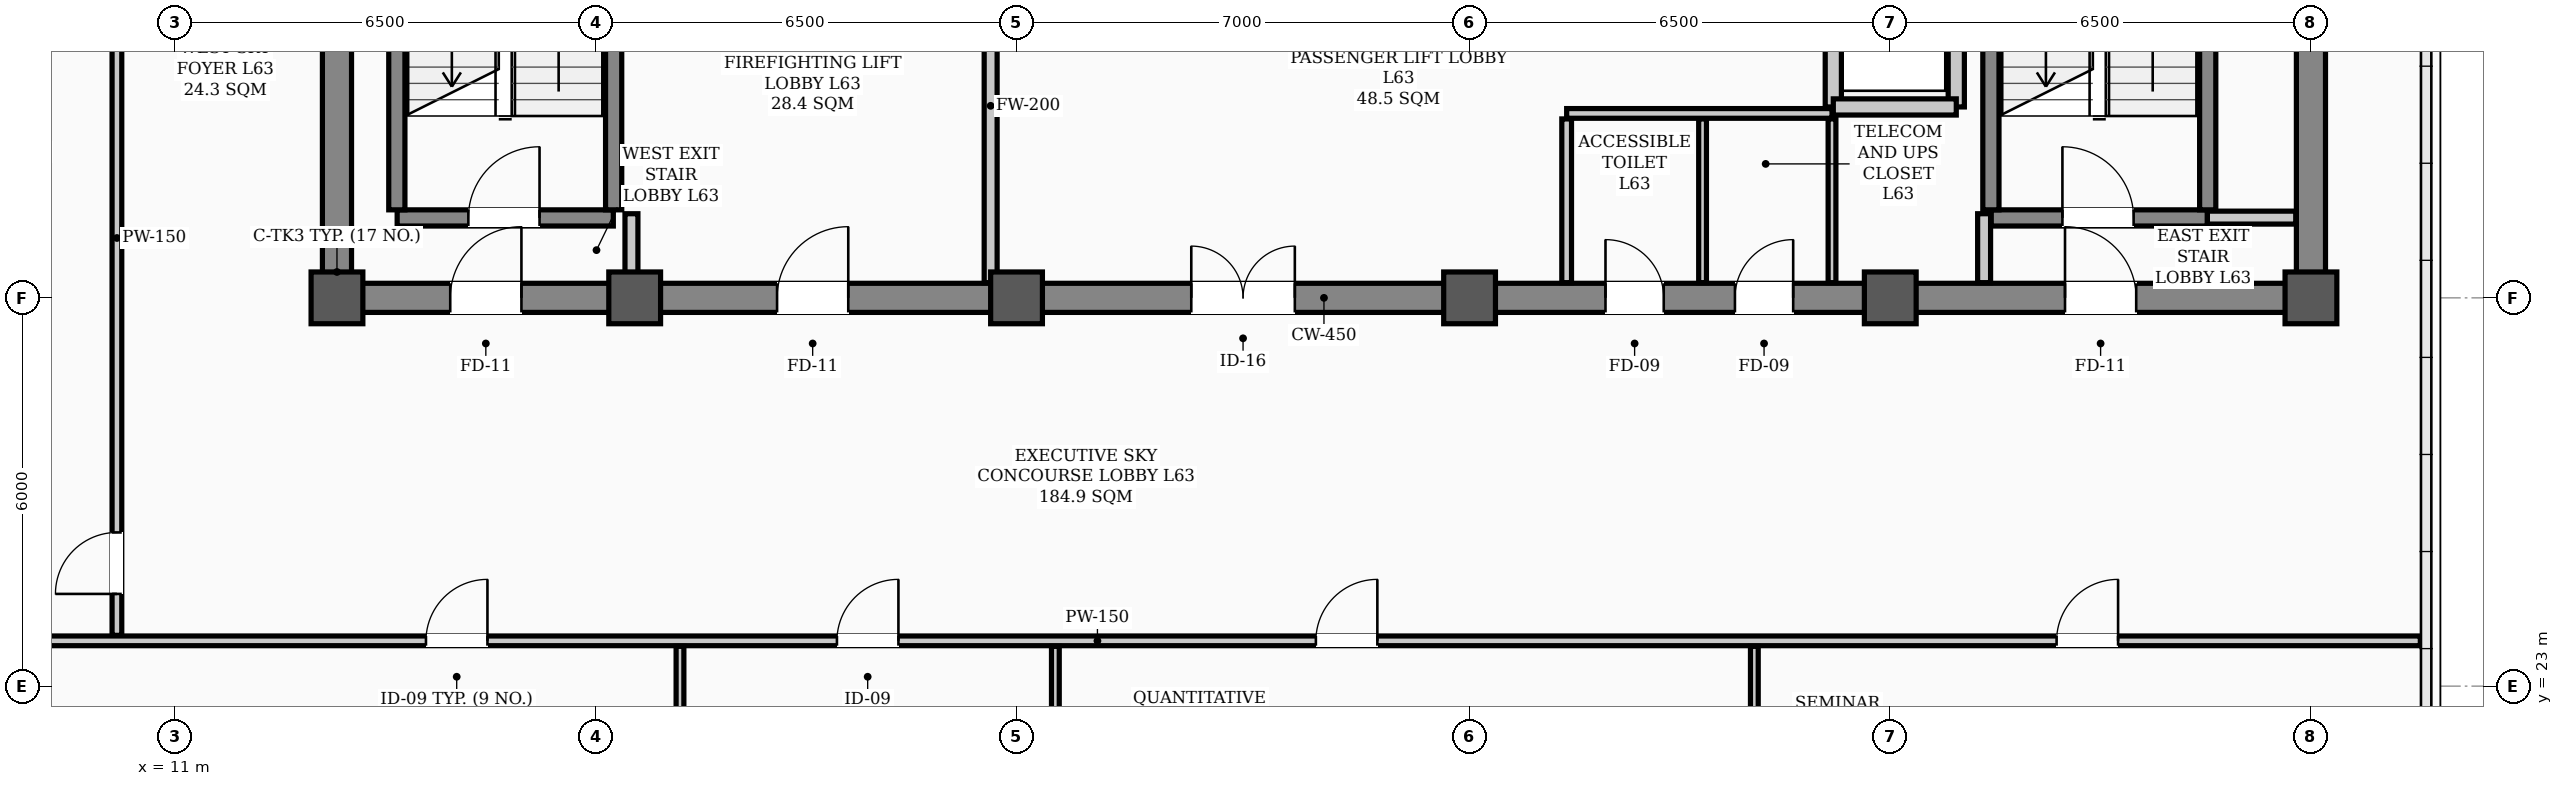
"""IFC4 building model, lengths in metres.
Left out: names, types, materials, properties, quantities, classifications, styles, units other than length and angle.
Written with IfcOpenShell. Run it as: python <this file> out.ifc"""

import sys

from ifc_helpers import new_model, si_unit, direction, frame, frame_2d, origin, origin_2d, place, context, subcontext, project, spatial, rectangle, hollow_rectangle, extrude, element, fill, save


model = new_model("IFC4")
c1 = context("Model", 3, precision=1e-05, world=origin(), true_north=direction((0.0, 1.0)))
c2 = subcontext(c1, "Body", "Model", "MODEL_VIEW")
j1 = project(units=[si_unit("LENGTHUNIT", "METRE"), si_unit("PLANEANGLEUNIT", "RADIAN")], contexts=[c1])
p1 = place(None, origin())
s1 = spatial("IfcSite", under=j1, at=p1, CompositionType="ELEMENT")
p2 = place(p1, origin())
s2 = spatial("IfcBuilding", under=s1, at=p2, CompositionType="ELEMENT")
p3 = place(p2, frame((0.0, 0.0, 254.0)))
s3 = spatial("IfcBuildingStorey", under=s2, at=p3, CompositionType="ELEMENT", Elevation=254.0)
for number, where, z_axis, x_axis in (
    (1, (13.5, 29.0, 0.0), (0.0, 0.0, 1.0), (1.0, 0.0, 0.0)),
    (2, (18.1, 29.0, 0.0), (0.0, 0.0, 1.0), (1.0, 0.0, 0.0)),
    (3, (24.0, 29.0, 0.0), (0.0, 0.0, 1.0), (1.0, 0.0, 0.0)),
    (4, (31.0, 29.0, 0.0), (0.0, 0.0, 1.0), (1.0, 0.0, 0.0)),
    (5, (37.5, 29.0, 0.0), (0.0, 0.0, 1.0), (1.0, 0.0, 0.0)),
    (6, (44.0, 29.0, 0.0), (0.0, 0.0, 1.0), (1.0, 0.0, 0.0)),
):
    element("IfcColumn", number, at=place(p3, frame(where, z_axis=z_axis, x_axis=x_axis)), inside=s3, PredefinedType="COLUMN", context=c2, shape_type="SweptSolid", body=[
        extrude(hollow_rectangle(XDim=0.8, YDim=0.8, WallThickness=0.032, InnerFilletRadius=0.016, OuterFilletRadius=0.048, at=origin_2d()), origin(), (0.0, 0.0, 1.0), 3.9),
    ])
p4 = place(p3, frame((13.5, 29.0, 0.0), z_axis=(0.0, 0.0, 1.0), x_axis=(1.0, 0.0, 0.0)))
e7 = element("IfcWall", 7, at=p4, inside=s3, PredefinedType="SHEAR", context=c2, shape_type="SweptSolid", body=[
    extrude(rectangle(XDim=30.5, YDim=0.45, at=frame_2d((15.25, 0.0))), origin(), (0.0, 0.0, 1.0), 3.66),
])
p5 = place(p4, frame((1.75, 0.0, 0.0)))
e8 = element("IfcOpeningElement", 8, at=p5, cuts=e7, PredefinedType="OPENING", context=c2, shape_type="SweptSolid", body=[
    extrude(rectangle(XDim=1.1, YDim=2.08, at=frame_2d((0.55, 1.04))), frame((0.0, 0.235, 0.0), z_axis=(0.0, -1.0, 0.0), x_axis=(1.0, 0.0, 0.0)), (0.0, 0.0, 1.0), 0.47),
])
p6 = place(p4, frame((26.7, 0.0, 0.0)))
e9 = element("IfcOpeningElement", 9, at=p6, cuts=e7, PredefinedType="OPENING", context=c2, shape_type="SweptSolid", body=[
    extrude(rectangle(XDim=1.1, YDim=2.08, at=frame_2d((0.55, 1.04))), frame((0.0, 0.235, 0.0), z_axis=(0.0, -1.0, 0.0), x_axis=(1.0, 0.0, 0.0)), (0.0, 0.0, 1.0), 0.47),
])
p7 = place(p4, frame((6.8, 0.0, 0.0)))
e10 = element("IfcOpeningElement", 10, at=p7, cuts=e7, PredefinedType="OPENING", context=c2, shape_type="SweptSolid", body=[
    extrude(rectangle(XDim=1.1, YDim=2.08, at=frame_2d((0.55, 1.04))), frame((0.0, 0.235, 0.0), z_axis=(0.0, -1.0, 0.0), x_axis=(1.0, 0.0, 0.0)), (0.0, 0.0, 1.0), 0.47),
])
p8 = place(p4, frame((13.2, 0.0, 0.0)))
e11 = element("IfcOpeningElement", 11, at=p8, cuts=e7, PredefinedType="OPENING", context=c2, shape_type="SweptSolid", body=[
    extrude(rectangle(XDim=1.6, YDim=2.08, at=frame_2d((0.8, 1.04))), frame((0.0, 0.235, 0.0), z_axis=(0.0, -1.0, 0.0), x_axis=(1.0, 0.0, 0.0)), (0.0, 0.0, 1.0), 0.47),
])
p9 = place(p4, frame((19.6, 0.0, 0.0)))
e12 = element("IfcOpeningElement", 12, at=p9, cuts=e7, PredefinedType="OPENING", context=c2, shape_type="SweptSolid", body=[
    extrude(rectangle(XDim=0.9, YDim=2.08, at=frame_2d((0.45, 1.04))), frame((0.0, 0.235, 0.0), z_axis=(0.0, -1.0, 0.0), x_axis=(1.0, 0.0, 0.0)), (0.0, 0.0, 1.0), 0.47),
])
p10 = place(p4, frame((21.6, 0.0, 0.0)))
e13 = element("IfcOpeningElement", 13, at=p10, cuts=e7, PredefinedType="OPENING", context=c2, shape_type="SweptSolid", body=[
    extrude(rectangle(XDim=0.9, YDim=2.08, at=frame_2d((0.45, 1.04))), frame((0.0, 0.235, 0.0), z_axis=(0.0, -1.0, 0.0), x_axis=(1.0, 0.0, 0.0)), (0.0, 0.0, 1.0), 0.47),
])
for number, where, z_axis, x_axis in (
    (14, (13.5, 29.35, 0.0), (0.0, 0.0, 1.0), (0.0, 1.0, 0.0)),
    (15, (44.0, 29.35, 0.0), (0.0, 0.0, 1.0), (0.0, 1.0, 0.0)),
):
    element("IfcWall", number, at=place(p3, frame(where, z_axis=z_axis, x_axis=x_axis)), inside=s3, PredefinedType="SHEAR", context=c2, shape_type="SweptSolid", body=[
        extrude(rectangle(XDim=8.6, YDim=0.45, at=frame_2d((4.3, 0.0))), origin(), (0.0, 0.0, 1.0), 3.66),
    ])
p11 = place(p3, frame((14.43, 30.235, 0.0), z_axis=(0.0, 0.0, 1.0), x_axis=(1.0, 0.0, 0.0)))
e16 = element("IfcWall", 16, at=p11, inside=s3, PredefinedType="STANDARD", context=c2, shape_type="SweptSolid", body=[
    extrude(rectangle(XDim=3.34, YDim=0.25, at=frame_2d((1.67, 0.0))), origin(), (0.0, 0.0, 1.0), 3.66),
])
p12 = place(p11, frame((1.1, 0.0, 0.0)))
e17 = element("IfcOpeningElement", 17, at=p12, cuts=e16, PredefinedType="OPENING", context=c2, shape_type="SweptSolid", body=[
    extrude(rectangle(XDim=1.1, YDim=2.08, at=frame_2d((0.55, 1.04))), frame((0.0, 0.135, 0.0), z_axis=(0.0, -1.0, 0.0), x_axis=(1.0, 0.0, 0.0)), (0.0, 0.0, 1.0), 0.27),
])
for number, where, z_axis, x_axis in (
    (18, (14.425, 30.36, 0.0), (0.0, 0.0, 1.0), (0.0, 1.0, 0.0)),
    (19, (17.775, 30.36, 0.0), (0.0, 0.0, 1.0), (0.0, 1.0, 0.0)),
):
    element("IfcWall", number, at=place(p3, frame(where, z_axis=z_axis, x_axis=x_axis)), inside=s3, PredefinedType="STANDARD", context=c2, shape_type="SweptSolid", body=[
        extrude(rectangle(XDim=7.184, YDim=0.25, at=frame_2d((3.592, 0.0))), origin(), (0.0, 0.0, 1.0), 3.66),
    ])
p13 = place(p3, frame((39.06, 30.235, 0.0), z_axis=(0.0, 0.0, 1.0), x_axis=(1.0, 0.0, 0.0)))
e20 = element("IfcWall", 20, at=p13, inside=s3, PredefinedType="STANDARD", context=c2, shape_type="SweptSolid", body=[
    extrude(rectangle(XDim=3.34, YDim=0.25, at=frame_2d((1.67, 0.0))), origin(), (0.0, 0.0, 1.0), 3.66),
])
p14 = place(p13, frame((1.1, 0.0, 0.0)))
e21 = element("IfcOpeningElement", 21, at=p14, cuts=e20, PredefinedType="OPENING", context=c2, shape_type="SweptSolid", body=[
    extrude(rectangle(XDim=1.1, YDim=2.08, at=frame_2d((0.55, 1.04))), frame((0.0, 0.135, 0.0), z_axis=(0.0, -1.0, 0.0), x_axis=(1.0, 0.0, 0.0)), (0.0, 0.0, 1.0), 0.27),
])
for number, where, z_axis, x_axis in (
    (22, (39.055, 30.36, 0.0), (0.0, 0.0, 1.0), (0.0, 1.0, 0.0)),
    (23, (42.405, 30.36, 0.0), (0.0, 0.0, 1.0), (0.0, 1.0, 0.0)),
):
    element("IfcWall", number, at=place(p3, frame(where, z_axis=z_axis, x_axis=x_axis)), inside=s3, PredefinedType="STANDARD", context=c2, shape_type="SweptSolid", body=[
        extrude(rectangle(XDim=7.184, YDim=0.25, at=frame_2d((3.592, 0.0))), origin(), (0.0, 0.0, 1.0), 3.66),
    ])
p15 = place(p3, frame((36.62, 31.95, 0.0), z_axis=(0.0, 0.0, 1.0), x_axis=(0.0, 1.0, 0.0)))
e24 = element("IfcWall", 24, at=p15, inside=s3, PredefinedType="STANDARD", context=c2, shape_type="SweptSolid", body=[
    extrude(rectangle(XDim=6.0, YDim=0.25, at=frame_2d((3.0, 0.0))), origin(), (0.0, 0.0, 1.0), 2.24),
])
p16 = place(p15, frame((0.9, 0.0, 0.0)))
e25 = element("IfcOpeningElement", 25, at=p16, cuts=e24, PredefinedType="OPENING", context=c2, shape_type="SweptSolid", body=[
    extrude(rectangle(XDim=1.1, YDim=2.08, at=frame_2d((0.55, 1.04))), frame((0.0, 0.135, 0.0), z_axis=(0.0, -1.0, 0.0), x_axis=(1.0, 0.0, 0.0)), (0.0, 0.0, 1.0), 0.27),
])
p17 = place(p15, frame((4.0, 0.0, 0.0)))
e26 = element("IfcOpeningElement", 26, at=p17, cuts=e24, PredefinedType="OPENING", context=c2, shape_type="SweptSolid", body=[
    extrude(rectangle(XDim=1.1, YDim=2.08, at=frame_2d((0.55, 1.04))), frame((0.0, 0.135, 0.0), z_axis=(0.0, -1.0, 0.0), x_axis=(1.0, 0.0, 0.0)), (0.0, 0.0, 1.0), 0.27),
])
p18 = place(p3, frame((38.52, 31.95, 0.0), z_axis=(0.0, 0.0, 1.0), x_axis=(0.0, 1.0, 0.0)))
e27 = element("IfcWall", 27, at=p18, inside=s3, PredefinedType="STANDARD", context=c2, shape_type="SweptSolid", body=[
    extrude(rectangle(XDim=6.0, YDim=0.25, at=frame_2d((3.0, 0.0))), origin(), (0.0, 0.0, 1.0), 3.48),
])
p19 = place(p3, frame((36.62, 31.95, 0.0), z_axis=(0.0, 0.0, 1.0), x_axis=(1.0, 0.0, 0.0)))
e28 = element("IfcWall", 28, at=p19, inside=s3, PredefinedType="STANDARD", context=c2, shape_type="SweptSolid", body=[
    extrude(rectangle(XDim=1.9, YDim=0.25, at=frame_2d((0.95, 0.0))), origin(), (0.0, 0.0, 1.0), 3.48),
])
p20 = place(p3, frame((42.4, 30.24, 0.0), z_axis=(0.0, 0.0, 1.0), x_axis=(1.0, 0.0, 0.0)))
e29 = element("IfcWall", 29, at=p20, inside=s3, PredefinedType="STANDARD", context=c2, shape_type="SweptSolid", body=[
    extrude(rectangle(XDim=1.365, YDim=0.2, at=frame_2d((0.683, 0.0))), origin(), (0.0, 0.0, 1.0), 3.66),
])
p21 = place(p3, frame((32.5, 31.85, 0.0), z_axis=(0.0, 0.0, 1.0), x_axis=(1.0, 0.0, 0.0)))
e30 = element("IfcWall", 30, at=p21, inside=s3, PredefinedType="PARTITIONING", context=c2, shape_type="SweptSolid", body=[
    extrude(rectangle(XDim=4.1, YDim=0.15, at=frame_2d((2.05, 0.0))), origin(), (0.0, 0.0, 1.0), 3.66),
])
p22 = place(p3, frame((4.81, 23.7, 0.0), z_axis=(0.0, 0.0, 1.0), x_axis=(1.0, 0.0, 0.0)))
e31 = element("IfcWall", 31, at=p22, inside=s3, PredefinedType="PARTITIONING", context=c2, shape_type="SweptSolid", body=[
    extrude(rectangle(XDim=40.88, YDim=0.15, at=frame_2d((20.44, 0.0))), origin(), (0.0, 0.0, 1.0), 2.24),
])
p23 = place(p22, frame((10.065, 0.0, 0.0)))
e32 = element("IfcOpeningElement", 32, at=p23, cuts=e31, PredefinedType="OPENING", context=c2, shape_type="SweptSolid", body=[
    extrude(rectangle(XDim=0.95, YDim=2.08, at=frame_2d((0.475, 1.04))), frame((0.0, 0.085, 0.0), z_axis=(0.0, -1.0, 0.0), x_axis=(1.0, 0.0, 0.0)), (0.0, 0.0, 1.0), 0.17),
])
p24 = place(p22, frame((16.415, 0.0, 0.0)))
e33 = element("IfcOpeningElement", 33, at=p24, cuts=e31, PredefinedType="OPENING", context=c2, shape_type="SweptSolid", body=[
    extrude(rectangle(XDim=0.95, YDim=2.08, at=frame_2d((0.475, 1.04))), frame((0.0, 0.085, 0.0), z_axis=(0.0, -1.0, 0.0), x_axis=(1.0, 0.0, 0.0)), (0.0, 0.0, 1.0), 0.17),
])
p25 = place(p22, frame((23.815, 0.0, 0.0)))
e34 = element("IfcOpeningElement", 34, at=p25, cuts=e31, PredefinedType="OPENING", context=c2, shape_type="SweptSolid", body=[
    extrude(rectangle(XDim=0.95, YDim=2.08, at=frame_2d((0.475, 1.04))), frame((0.0, 0.085, 0.0), z_axis=(0.0, -1.0, 0.0), x_axis=(1.0, 0.0, 0.0)), (0.0, 0.0, 1.0), 0.17),
])
p26 = place(p22, frame((35.26, 0.0, 0.0)))
e35 = element("IfcOpeningElement", 35, at=p26, cuts=e31, PredefinedType="OPENING", context=c2, shape_type="SweptSolid", body=[
    extrude(rectangle(XDim=0.95, YDim=2.08, at=frame_2d((0.475, 1.04))), frame((0.0, 0.085, 0.0), z_axis=(0.0, -1.0, 0.0), x_axis=(1.0, 0.0, 0.0)), (0.0, 0.0, 1.0), 0.17),
])
p27 = place(p3, frame((18.05, 29.235, 0.0), z_axis=(0.0, 0.0, 1.0), x_axis=(0.0, 1.0, 0.0)))
e36 = element("IfcWall", 36, at=p27, inside=s3, PredefinedType="STANDARD", context=c2, shape_type="SweptSolid", body=[
    extrude(rectangle(XDim=1.065, YDim=0.2, at=frame_2d((0.532, 0.0))), origin(), (0.0, 0.0, 1.0), 2.24),
])
p28 = place(p3, frame((38.95, 29.235, 0.0), z_axis=(0.0, 0.0, 1.0), x_axis=(0.0, 1.0, 0.0)))
e37 = element("IfcWall", 37, at=p28, inside=s3, PredefinedType="STANDARD", context=c2, shape_type="SweptSolid", body=[
    extrude(rectangle(XDim=1.065, YDim=0.2, at=frame_2d((0.532, 0.0))), origin(), (0.0, 0.0, 1.0), 3.66),
])
p29 = place(p3, frame((23.6, 29.235, 0.0), z_axis=(0.0, 0.0, 1.0), x_axis=(0.0, 1.0, 0.0)))
e38 = element("IfcWall", 38, at=p29, inside=s3, PredefinedType="STANDARD", context=c2, shape_type="SweptSolid", body=[
    extrude(rectangle(XDim=5.465, YDim=0.2, at=frame_2d((2.732, 0.0))), origin(), (0.0, 0.0, 1.0), 2.24),
])
p30 = place(p3, frame((32.5, 29.235, 0.0), z_axis=(0.0, 0.0, 1.0), x_axis=(0.0, 1.0, 0.0)))
e39 = element("IfcWall", 39, at=p30, inside=s3, PredefinedType="PARTITIONING", context=c2, shape_type="SweptSolid", body=[
    extrude(rectangle(XDim=2.53, YDim=0.15, at=frame_2d((1.265, 0.0))), origin(), (0.0, 0.0, 1.0), 2.24),
])
for number, where, z_axis, x_axis in (
    (40, (36.6, 29.235, 0.0), (0.0, 0.0, 1.0), (0.0, 1.0, 0.0)),
    (41, (34.6, 29.235, 0.0), (0.0, 0.0, 1.0), (0.0, 1.0, 0.0)),
):
    element("IfcWall", number, at=place(p3, frame(where, z_axis=z_axis, x_axis=x_axis)), inside=s3, PredefinedType="PARTITIONING", context=c2, shape_type="SweptSolid", body=[
        extrude(rectangle(XDim=2.53, YDim=0.12, at=frame_2d((1.265, 0.0))), origin(), (0.0, 0.0, 1.0), 2.24),
    ])
p31 = place(p3, frame((10.1, 23.785, 0.0), z_axis=(0.0, 0.0, 1.0), x_axis=(0.0, 1.0, 0.0)))
e42 = element("IfcWall", 42, at=p31, inside=s3, PredefinedType="PARTITIONING", context=c2, shape_type="SweptSolid", body=[
    extrude(rectangle(XDim=12.28, YDim=0.15, at=frame_2d((6.14, 0.0))), origin(), (0.0, 0.0, 1.0), 2.24),
])
p32 = place(p31, frame((0.64, 0.0, 0.0)))
e43 = element("IfcOpeningElement", 43, at=p32, cuts=e42, PredefinedType="OPENING", context=c2, shape_type="SweptSolid", body=[
    extrude(rectangle(XDim=0.95, YDim=2.08, at=frame_2d((0.475, 1.04))), frame((0.0, 0.085, 0.0), z_axis=(0.0, -1.0, 0.0), x_axis=(1.0, 0.0, 0.0)), (0.0, 0.0, 1.0), 0.17),
])
p33 = place(p3, frame((18.8, 12.41, 0.0), z_axis=(0.0, 0.0, 1.0), x_axis=(0.0, 1.0, 0.0)))
e44 = element("IfcWall", 44, at=p33, inside=s3, PredefinedType="PARTITIONING", context=c2, shape_type="SweptSolid", body=[
    extrude(rectangle(XDim=11.205, YDim=0.12, at=frame_2d((5.603, 0.0))), origin(), (0.0, 0.0, 1.0), 2.24),
])
p34 = place(p3, frame((24.6, 14.17, 0.0), z_axis=(0.0, 0.0, 1.0), x_axis=(0.0, 1.0, 0.0)))
e45 = element("IfcWall", 45, at=p34, inside=s3, PredefinedType="PARTITIONING", context=c2, shape_type="SweptSolid", body=[
    extrude(rectangle(XDim=9.445, YDim=0.12, at=frame_2d((4.723, 0.0))), origin(), (0.0, 0.0, 1.0), 2.24),
])
p35 = place(p3, frame((35.4, 12.41, 0.0), z_axis=(0.0, 0.0, 1.0), x_axis=(0.0, 1.0, 0.0)))
e46 = element("IfcWall", 46, at=p35, inside=s3, PredefinedType="PARTITIONING", context=c2, shape_type="SweptSolid", body=[
    extrude(rectangle(XDim=11.205, YDim=0.12, at=frame_2d((5.603, 0.0))), origin(), (0.0, 0.0, 1.0), 2.24),
])
p36 = place(p12, origin())
e47 = element("IfcDoor", 47, at=p36, inside=s3, OperationType="SINGLE_SWING_RIGHT", PredefinedType="DOOR", context=c2, shape_type="SweptSolid", body=[
    extrude(rectangle(XDim=1.1, YDim=2.08, at=frame_2d((0.55, 1.04))), frame((0.0, 0.025, 0.0), z_axis=(0.0, -1.0, 0.0), x_axis=(1.0, 0.0, 0.0)), (0.0, 0.0, 1.0), 0.05),
])
fill(e17, e47)
p37 = place(p14, origin())
e48 = element("IfcDoor", 48, at=p37, inside=s3, OperationType="SINGLE_SWING_LEFT", PredefinedType="DOOR", context=c2, shape_type="SweptSolid", body=[
    extrude(rectangle(XDim=1.1, YDim=2.08, at=frame_2d((0.55, 1.04))), frame((0.0, 0.025, 0.0), z_axis=(0.0, -1.0, 0.0), x_axis=(1.0, 0.0, 0.0)), (0.0, 0.0, 1.0), 0.05),
])
fill(e21, e48)
p38 = place(p5, origin())
e49 = element("IfcDoor", 49, at=p38, inside=s3, OperationType="SINGLE_SWING_RIGHT", PredefinedType="DOOR", context=c2, shape_type="SweptSolid", body=[
    extrude(rectangle(XDim=1.1, YDim=2.08, at=frame_2d((0.55, 1.04))), frame((0.0, 0.025, 0.0), z_axis=(0.0, -1.0, 0.0), x_axis=(1.0, 0.0, 0.0)), (0.0, 0.0, 1.0), 0.05),
])
fill(e8, e49)
p39 = place(p6, origin())
e50 = element("IfcDoor", 50, at=p39, inside=s3, OperationType="SINGLE_SWING_LEFT", PredefinedType="DOOR", context=c2, shape_type="SweptSolid", body=[
    extrude(rectangle(XDim=1.1, YDim=2.08, at=frame_2d((0.55, 1.04))), frame((0.0, 0.025, 0.0), z_axis=(0.0, -1.0, 0.0), x_axis=(1.0, 0.0, 0.0)), (0.0, 0.0, 1.0), 0.05),
])
fill(e9, e50)
p40 = place(p7, origin())
e51 = element("IfcDoor", 51, at=p40, inside=s3, OperationType="SINGLE_SWING_RIGHT", PredefinedType="DOOR", context=c2, shape_type="SweptSolid", body=[
    extrude(rectangle(XDim=1.1, YDim=2.08, at=frame_2d((0.55, 1.04))), frame((0.0, 0.025, 0.0), z_axis=(0.0, -1.0, 0.0), x_axis=(1.0, 0.0, 0.0)), (0.0, 0.0, 1.0), 0.05),
])
fill(e10, e51)
p41 = place(p8, origin())
e52 = element("IfcDoor", 52, at=p41, inside=s3, OperationType="DOUBLE_DOOR_SINGLE_SWING", PredefinedType="DOOR", context=c2, shape_type="SweptSolid", body=[
    extrude(rectangle(XDim=1.6, YDim=2.08, at=frame_2d((0.8, 1.04))), frame((0.0, 0.025, 0.0), z_axis=(0.0, -1.0, 0.0), x_axis=(1.0, 0.0, 0.0)), (0.0, 0.0, 1.0), 0.05),
])
fill(e11, e52)
p42 = place(p9, origin())
e53 = element("IfcDoor", 53, at=p42, inside=s3, OperationType="SINGLE_SWING_LEFT", PredefinedType="DOOR", context=c2, shape_type="SweptSolid", body=[
    extrude(rectangle(XDim=0.9, YDim=2.08, at=frame_2d((0.45, 1.04))), frame((0.0, 0.025, 0.0), z_axis=(0.0, -1.0, 0.0), x_axis=(1.0, 0.0, 0.0)), (0.0, 0.0, 1.0), 0.05),
])
fill(e12, e53)
p43 = place(p10, origin())
e54 = element("IfcDoor", 54, at=p43, inside=s3, OperationType="SINGLE_SWING_RIGHT", PredefinedType="DOOR", context=c2, shape_type="SweptSolid", body=[
    extrude(rectangle(XDim=0.9, YDim=2.08, at=frame_2d((0.45, 1.04))), frame((0.0, 0.025, 0.0), z_axis=(0.0, -1.0, 0.0), x_axis=(1.0, 0.0, 0.0)), (0.0, 0.0, 1.0), 0.05),
])
fill(e13, e54)
p44 = place(p23, origin())
e55 = element("IfcDoor", 55, at=p44, inside=s3, OperationType="SINGLE_SWING_RIGHT", PredefinedType="DOOR", context=c2, shape_type="SweptSolid", body=[
    extrude(rectangle(XDim=0.95, YDim=2.08, at=frame_2d((0.475, 1.04))), frame((0.0, 0.025, 0.0), z_axis=(0.0, -1.0, 0.0), x_axis=(1.0, 0.0, 0.0)), (0.0, 0.0, 1.0), 0.05),
])
fill(e32, e55)
p45 = place(p24, origin())
e56 = element("IfcDoor", 56, at=p45, inside=s3, OperationType="SINGLE_SWING_RIGHT", PredefinedType="DOOR", context=c2, shape_type="SweptSolid", body=[
    extrude(rectangle(XDim=0.95, YDim=2.08, at=frame_2d((0.475, 1.04))), frame((0.0, 0.025, 0.0), z_axis=(0.0, -1.0, 0.0), x_axis=(1.0, 0.0, 0.0)), (0.0, 0.0, 1.0), 0.05),
])
fill(e33, e56)
p46 = place(p25, origin())
e57 = element("IfcDoor", 57, at=p46, inside=s3, OperationType="SINGLE_SWING_RIGHT", PredefinedType="DOOR", context=c2, shape_type="SweptSolid", body=[
    extrude(rectangle(XDim=0.95, YDim=2.08, at=frame_2d((0.475, 1.04))), frame((0.0, 0.025, 0.0), z_axis=(0.0, -1.0, 0.0), x_axis=(1.0, 0.0, 0.0)), (0.0, 0.0, 1.0), 0.05),
])
fill(e34, e57)
p47 = place(p26, origin())
e58 = element("IfcDoor", 58, at=p47, inside=s3, OperationType="SINGLE_SWING_RIGHT", PredefinedType="DOOR", context=c2, shape_type="SweptSolid", body=[
    extrude(rectangle(XDim=0.95, YDim=2.08, at=frame_2d((0.475, 1.04))), frame((0.0, 0.025, 0.0), z_axis=(0.0, -1.0, 0.0), x_axis=(1.0, 0.0, 0.0)), (0.0, 0.0, 1.0), 0.05),
])
fill(e35, e58)
p48 = place(p32, origin())
e59 = element("IfcDoor", 59, at=p48, inside=s3, OperationType="SINGLE_SWING_LEFT", PredefinedType="DOOR", context=c2, shape_type="SweptSolid", body=[
    extrude(rectangle(XDim=0.95, YDim=2.08, at=frame_2d((0.475, 1.04))), frame((0.0, 0.025, 0.0), z_axis=(0.0, -1.0, 0.0), x_axis=(1.0, 0.0, 0.0)), (0.0, 0.0, 1.0), 0.05),
])
fill(e43, e59)
save(model, sys.argv[1])
